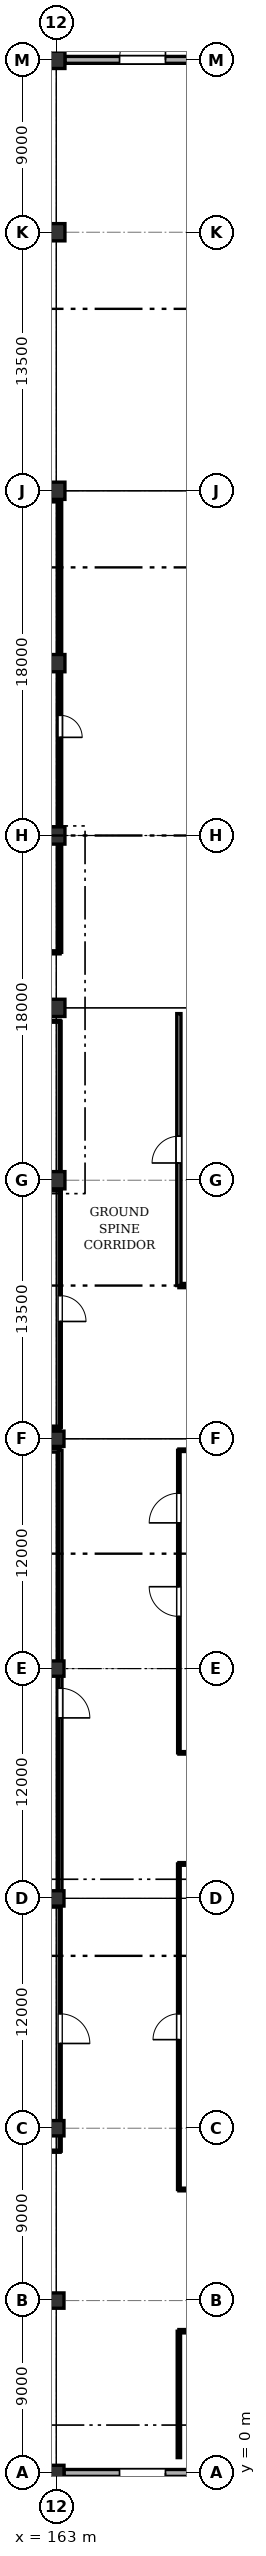
"""IFC4 building model, lengths in metres.
Left out: names, types, materials, properties, quantities, classifications, styles, units other than length and angle.
Written with IfcOpenShell. Run it as: python <this file> out.ifc"""

import sys

from ifc_helpers import new_model, si_unit, direction, frame, frame_2d, origin, origin_2d, place, context, subcontext, project, spatial, rectangle, extrude, element, fill, save


model = new_model("IFC4")
c1 = context("Model", 3, precision=1e-05, world=origin(), true_north=direction((0.0, 1.0)))
c2 = subcontext(c1, "Body", "Model", "MODEL_VIEW")
j1 = project(units=[si_unit("LENGTHUNIT", "METRE"), si_unit("PLANEANGLEUNIT", "RADIAN")], contexts=[c1])
p1 = place(None, origin())
s1 = spatial("IfcSite", under=j1, at=p1, CompositionType="ELEMENT")
p2 = place(p1, origin())
s2 = spatial("IfcBuilding", under=s1, at=p2, CompositionType="ELEMENT")
p3 = place(p2, origin())
s3 = spatial("IfcBuildingStorey", under=s2, at=p3, CompositionType="ELEMENT", Elevation=0.0)
for number, where, z_axis, x_axis in (
    (1, (163.0, 0.0, 0.0), (0.0, 0.0, 1.0), (1.0, 0.0, 0.0)),
    (2, (163.0, 9.0, 0.0), (0.0, 0.0, 1.0), (1.0, 0.0, 0.0)),
    (3, (163.0, 18.0, 0.0), (0.0, 0.0, 1.0), (1.0, 0.0, 0.0)),
    (4, (163.0, 30.0, 0.0), (0.0, 0.0, 1.0), (1.0, 0.0, 0.0)),
    (5, (163.0, 42.0, 0.0), (0.0, 0.0, 1.0), (1.0, 0.0, 0.0)),
    (6, (163.0, 54.0, 0.0), (0.0, 0.0, 1.0), (1.0, 0.0, 0.0)),
):
    element("IfcColumn", number, at=place(p3, frame(where, z_axis=z_axis, x_axis=x_axis)), inside=s3, PredefinedType="COLUMN", context=c2, shape_type="SweptSolid", body=[
        extrude(rectangle(XDim=0.8, YDim=0.8, at=origin_2d()), origin(), (0.0, 0.0, 1.0), 6.6),
    ])
for number, where, z_axis, x_axis in (
    (7, (163.0, 67.5, 0.0), (0.0, 0.0, 1.0), (1.0, 0.0, 0.0)),
    (8, (163.0, 76.5, 0.0), (0.0, 0.0, 1.0), (1.0, 0.0, 0.0)),
    (9, (163.0, 85.5, 0.0), (0.0, 0.0, 1.0), (1.0, 0.0, 0.0)),
    (10, (163.0, 94.5, 0.0), (0.0, 0.0, 1.0), (1.0, 0.0, 0.0)),
    (11, (163.0, 103.5, 0.0), (0.0, 0.0, 1.0), (1.0, 0.0, 0.0)),
    (12, (163.0, 117.0, 0.0), (0.0, 0.0, 1.0), (1.0, 0.0, 0.0)),
    (13, (163.0, 126.0, 0.0), (0.0, 0.0, 1.0), (1.0, 0.0, 0.0)),
):
    element("IfcColumn", number, at=place(p3, frame(where, z_axis=z_axis, x_axis=x_axis)), inside=s3, PredefinedType="COLUMN", context=c2, shape_type="SweptSolid", body=[
        extrude(rectangle(XDim=0.9, YDim=0.9, at=origin_2d()), origin(), (0.0, 0.0, 1.0), 6.6),
    ])
p4 = place(p3, frame((171.6, 0.0, 0.0), z_axis=(0.0, 0.0, 1.0), x_axis=(-1.0, 0.0, 0.0)))
e14 = element("IfcWall", 14, at=p4, inside=s3, PredefinedType="SOLIDWALL", context=c2, shape_type="SweptSolid", body=[
    extrude(rectangle(XDim=8.2, YDim=0.36, at=frame_2d((4.1, 0.0))), origin(), (0.0, 0.0, 1.0), 5.875),
])
p5 = place(p4, frame((2.9, 0.0, 0.0)))
e15 = element("IfcOpeningElement", 15, at=p5, cuts=e14, PredefinedType="OPENING", context=c2, shape_type="SweptSolid", body=[
    extrude(rectangle(XDim=2.4, YDim=2.5, at=frame_2d((1.2, 1.25))), frame((0.0, 0.19, 0.0), z_axis=(0.0, -1.0, 0.0), x_axis=(1.0, 0.0, 0.0)), (0.0, 0.0, 1.0), 0.38),
])
p6 = place(p3, frame((163.45, 126.0, 0.0), z_axis=(0.0, 0.0, 1.0), x_axis=(1.0, 0.0, 0.0)))
e16 = element("IfcWall", 16, at=p6, inside=s3, PredefinedType="SOLIDWALL", context=c2, shape_type="SweptSolid", body=[
    extrude(rectangle(XDim=8.1, YDim=0.36, at=frame_2d((4.05, 0.0))), origin(), (0.0, 0.0, 1.0), 5.875),
])
p7 = place(p6, frame((2.85, 0.0, 0.0)))
e17 = element("IfcOpeningElement", 17, at=p7, cuts=e16, PredefinedType="OPENING", context=c2, shape_type="SweptSolid", body=[
    extrude(rectangle(XDim=2.4, YDim=2.5, at=frame_2d((1.2, 1.25))), frame((0.0, 0.19, 0.0), z_axis=(0.0, -1.0, 0.0), x_axis=(1.0, 0.0, 0.0)), (0.0, 0.0, 1.0), 0.38),
])
for number, where, z_axis, x_axis in (
    (18, (163.2, 16.8, 0.0), (0.0, 0.0, 1.0), (-1.0, 0.0, 0.0)),
    (19, (152.6, 29.6, 0.0), (0.0, 0.0, 1.0), (1.0, 0.0, 0.0)),
):
    element("IfcWall", number, at=place(p3, frame(where, z_axis=z_axis, x_axis=x_axis)), inside=s3, PredefinedType="PARTITIONING", context=c2, shape_type="SweptSolid", body=[
        extrude(rectangle(XDim=10.6, YDim=0.11, at=frame_2d((5.3, 0.0))), origin(), (0.0, 0.0, 1.0), 4.4),
    ])
p8 = place(p3, frame((163.2, 29.6, 0.0), z_axis=(0.0, 0.0, 1.0), x_axis=(0.0, -1.0, 0.0)))
e20 = element("IfcWall", 20, at=p8, inside=s3, PredefinedType="PARTITIONING", context=c2, shape_type="SweptSolid", body=[
    extrude(rectangle(XDim=12.8, YDim=0.11, at=frame_2d((6.4, 0.0))), origin(), (0.0, 0.0, 1.0), 4.4),
])
p9 = place(p8, frame((5.625, 0.0, 0.0)))
e21 = element("IfcOpeningElement", 21, at=p9, cuts=e20, PredefinedType="OPENING", context=c2, shape_type="SweptSolid", body=[
    extrude(rectangle(XDim=1.55, YDim=2.1, at=frame_2d((0.775, 1.05))), frame((0.0, 0.065, 0.0), z_axis=(0.0, -1.0, 0.0), x_axis=(1.0, 0.0, 0.0)), (0.0, 0.0, 1.0), 0.13),
])
p10 = place(p3, frame((136.8, 53.4, 0.0), z_axis=(0.0, 0.0, 1.0), x_axis=(1.0, 0.0, 0.0)))
e22 = element("IfcWall", 22, at=p10, inside=s3, PredefinedType="PARTITIONING", context=c2, shape_type="SweptSolid", body=[
    extrude(rectangle(XDim=26.4, YDim=0.19, at=frame_2d((13.2, 0.0))), origin(), (0.0, 0.0, 1.0), 4.4),
])
p11 = place(p3, frame((163.2, 53.4, 0.0), z_axis=(0.0, 0.0, 1.0), x_axis=(0.0, -1.0, 0.0)))
e23 = element("IfcWall", 23, at=p11, inside=s3, PredefinedType="PARTITIONING", context=c2, shape_type="SweptSolid", body=[
    extrude(rectangle(XDim=23.2, YDim=0.19, at=frame_2d((11.6, 0.0))), origin(), (0.0, 0.0, 1.0), 4.4),
])
p12 = place(p11, frame((12.425, 0.0, 0.0)))
e24 = element("IfcOpeningElement", 24, at=p12, cuts=e23, PredefinedType="OPENING", context=c2, shape_type="SweptSolid", body=[
    extrude(rectangle(XDim=1.55, YDim=2.1, at=frame_2d((0.775, 1.05))), frame((0.0, 0.105, 0.0), z_axis=(0.0, -1.0, 0.0), x_axis=(1.0, 0.0, 0.0)), (0.0, 0.0, 1.0), 0.21),
])
p13 = place(p3, frame((169.4, 7.4, 0.0), z_axis=(0.0, 0.0, 1.0), x_axis=(1.0, 0.0, 0.0)))
e25 = element("IfcWall", 25, at=p13, inside=s3, PredefinedType="PARTITIONING", context=c2, shape_type="SweptSolid", body=[
    extrude(rectangle(XDim=9.6, YDim=0.175, at=frame_2d((4.8, 0.0))), origin(), (0.0, 0.0, 1.0), 4.4),
])
p14 = place(p13, frame((4.125, 0.0, 0.0)))
e26 = element("IfcOpeningElement", 26, at=p14, cuts=e25, PredefinedType="OPENING", context=c2, shape_type="SweptSolid", body=[
    extrude(rectangle(XDim=1.35, YDim=2.1, at=frame_2d((0.675, 1.05))), frame((0.0, 0.097, 0.0), z_axis=(0.0, -1.0, 0.0), x_axis=(1.0, 0.0, 0.0)), (0.0, 0.0, 1.0), 0.195),
])
p15 = place(p3, frame((169.4, 0.8, 0.0), z_axis=(0.0, 0.0, 1.0), x_axis=(0.0, 1.0, 0.0)))
e27 = element("IfcWall", 27, at=p15, inside=s3, PredefinedType="PARTITIONING", context=c2, shape_type="SweptSolid", body=[
    extrude(rectangle(XDim=6.6, YDim=0.175, at=frame_2d((3.3, 0.0))), origin(), (0.0, 0.0, 1.0), 4.4),
])
for number, where, z_axis, x_axis in (
    (28, (187.2, 14.8, 0.0), (0.0, 0.0, 1.0), (-1.0, 0.0, 0.0)),
    (29, (169.4, 31.8, 0.0), (0.0, 0.0, 1.0), (1.0, 0.0, 0.0)),
):
    element("IfcWall", number, at=place(p3, frame(where, z_axis=z_axis, x_axis=x_axis)), inside=s3, PredefinedType="PARTITIONING", context=c2, shape_type="SweptSolid", body=[
        extrude(rectangle(XDim=17.8, YDim=0.14, at=frame_2d((8.9, 0.0))), origin(), (0.0, 0.0, 1.0), 4.4),
    ])
p16 = place(p3, frame((169.4, 14.8, 0.0), z_axis=(0.0, 0.0, 1.0), x_axis=(0.0, 1.0, 0.0)))
e30 = element("IfcWall", 30, at=p16, inside=s3, PredefinedType="PARTITIONING", context=c2, shape_type="SweptSolid", body=[
    extrude(rectangle(XDim=17.0, YDim=0.14, at=frame_2d((8.5, 0.0))), origin(), (0.0, 0.0, 1.0), 4.4),
])
p17 = place(p16, frame((7.825, 0.0, 0.0)))
e31 = element("IfcOpeningElement", 31, at=p17, cuts=e30, PredefinedType="OPENING", context=c2, shape_type="SweptSolid", body=[
    extrude(rectangle(XDim=1.35, YDim=2.1, at=frame_2d((0.675, 1.05))), frame((0.0, 0.08, 0.0), z_axis=(0.0, -1.0, 0.0), x_axis=(1.0, 0.0, 0.0)), (0.0, 0.0, 1.0), 0.16),
])
for number, where, z_axis, x_axis in (
    (32, (187.2, 37.6, 0.0), (0.0, 0.0, 1.0), (-1.0, 0.0, 0.0)),
    (33, (169.4, 53.4, 0.0), (0.0, 0.0, 1.0), (1.0, 0.0, 0.0)),
):
    element("IfcWall", number, at=place(p3, frame(where, z_axis=z_axis, x_axis=x_axis)), inside=s3, PredefinedType="PARTITIONING", context=c2, shape_type="SweptSolid", body=[
        extrude(rectangle(XDim=17.8, YDim=0.13, at=frame_2d((8.9, 0.0))), origin(), (0.0, 0.0, 1.0), 4.4),
    ])
p18 = place(p3, frame((169.4, 37.6, 0.0), z_axis=(0.0, 0.0, 1.0), x_axis=(0.0, 1.0, 0.0)))
e34 = element("IfcWall", 34, at=p18, inside=s3, PredefinedType="PARTITIONING", context=c2, shape_type="SweptSolid", body=[
    extrude(rectangle(XDim=15.8, YDim=0.13, at=frame_2d((7.9, 0.0))), origin(), (0.0, 0.0, 1.0), 4.4),
])
p19 = place(p18, frame((7.125, 0.0, 0.0)))
e35 = element("IfcOpeningElement", 35, at=p19, cuts=e34, PredefinedType="OPENING", context=c2, shape_type="SweptSolid", body=[
    extrude(rectangle(XDim=1.55, YDim=2.1, at=frame_2d((0.775, 1.05))), frame((0.0, 0.075, 0.0), z_axis=(0.0, -1.0, 0.0), x_axis=(1.0, 0.0, 0.0)), (0.0, 0.0, 1.0), 0.15),
])
p20 = place(p18, frame((12.008, 0.0, 0.0)))
e36 = element("IfcOpeningElement", 36, at=p20, cuts=e34, PredefinedType="OPENING", context=c2, shape_type="SweptSolid", body=[
    extrude(rectangle(XDim=1.55, YDim=2.1, at=frame_2d((0.775, 1.05))), frame((0.0, 0.075, 0.0), z_axis=(0.0, -1.0, 0.0), x_axis=(1.0, 0.0, 0.0)), (0.0, 0.0, 1.0), 0.15),
])
for number, where, z_axis, x_axis in (
    (37, (163.2, 54.6, 0.0), (0.0, 0.0, 1.0), (-1.0, 0.0, 0.0)),
    (38, (136.8, 67.0, 0.0), (0.0, 0.0, 1.0), (1.0, 0.0, 0.0)),
):
    element("IfcWall", number, at=place(p3, frame(where, z_axis=z_axis, x_axis=x_axis)), inside=s3, PredefinedType="PARTITIONING", context=c2, shape_type="SweptSolid", body=[
        extrude(rectangle(XDim=26.4, YDim=0.12, at=frame_2d((13.2, 0.0))), origin(), (0.0, 0.0, 1.0), 4.4),
    ])
p21 = place(p3, frame((163.2, 67.0, 0.0), z_axis=(0.0, 0.0, 1.0), x_axis=(0.0, -1.0, 0.0)))
e39 = element("IfcWall", 39, at=p21, inside=s3, PredefinedType="PARTITIONING", context=c2, shape_type="SweptSolid", body=[
    extrude(rectangle(XDim=12.4, YDim=0.12, at=frame_2d((6.2, 0.0))), origin(), (0.0, 0.0, 1.0), 4.4),
])
p22 = place(p21, frame((5.525, 0.0, 0.0)))
e40 = element("IfcOpeningElement", 40, at=p22, cuts=e39, PredefinedType="OPENING", context=c2, shape_type="SweptSolid", body=[
    extrude(rectangle(XDim=1.35, YDim=2.1, at=frame_2d((0.675, 1.05))), frame((0.0, 0.07, 0.0), z_axis=(0.0, -1.0, 0.0), x_axis=(1.0, 0.0, 0.0)), (0.0, 0.0, 1.0), 0.14),
])
p23 = place(p3, frame((150.0, 75.8, 0.0), z_axis=(0.0, 0.0, 1.0), x_axis=(1.0, 0.0, 0.0)))
e41 = element("IfcWall", 41, at=p23, inside=s3, PredefinedType="PARTITIONING", context=c2, shape_type="SweptSolid", body=[
    extrude(rectangle(XDim=13.2, YDim=0.1, at=frame_2d((6.6, 0.0))), origin(), (0.0, 0.0, 1.0), 4.4),
])
p24 = place(p23, frame((6.15, 0.0, 0.0)))
e42 = element("IfcOpeningElement", 42, at=p24, cuts=e41, PredefinedType="OPENING", context=c2, shape_type="SweptSolid", body=[
    extrude(rectangle(XDim=0.9, YDim=2.1, at=frame_2d((0.45, 1.05))), frame((0.0, 0.06, 0.0), z_axis=(0.0, -1.0, 0.0), x_axis=(1.0, 0.0, 0.0)), (0.0, 0.0, 1.0), 0.12),
])
p25 = place(p3, frame((163.2, 75.8, 0.0), z_axis=(0.0, 0.0, 1.0), x_axis=(0.0, -1.0, 0.0)))
e43 = element("IfcWall", 43, at=p25, inside=s3, PredefinedType="PARTITIONING", context=c2, shape_type="SweptSolid", body=[
    extrude(rectangle(XDim=8.2, YDim=0.1, at=frame_2d((4.1, 0.0))), origin(), (0.0, 0.0, 1.0), 4.4),
])
for number, where, z_axis, x_axis in (
    (44, (163.2, 79.4, 0.0), (0.0, 0.0, 1.0), (-1.0, 0.0, 0.0)),
    (45, (145.8, 103.0, 0.0), (0.0, 0.0, 1.0), (1.0, 0.0, 0.0)),
):
    element("IfcWall", number, at=place(p3, frame(where, z_axis=z_axis, x_axis=x_axis)), inside=s3, PredefinedType="PARTITIONING", context=c2, shape_type="SweptSolid", body=[
        extrude(rectangle(XDim=17.4, YDim=0.16, at=frame_2d((8.7, 0.0))), origin(), (0.0, 0.0, 1.0), 4.4),
    ])
p26 = place(p3, frame((163.2, 103.0, 0.0), z_axis=(0.0, 0.0, 1.0), x_axis=(0.0, -1.0, 0.0)))
e46 = element("IfcWall", 46, at=p26, inside=s3, PredefinedType="PARTITIONING", context=c2, shape_type="SweptSolid", body=[
    extrude(rectangle(XDim=23.6, YDim=0.16, at=frame_2d((11.8, 0.0))), origin(), (0.0, 0.0, 1.0), 4.4),
])
p27 = place(p26, frame((11.225, 0.0, 0.0)))
e47 = element("IfcOpeningElement", 47, at=p27, cuts=e46, PredefinedType="OPENING", context=c2, shape_type="SweptSolid", body=[
    extrude(rectangle(XDim=1.15, YDim=2.1, at=frame_2d((0.575, 1.05))), frame((0.0, 0.09, 0.0), z_axis=(0.0, -1.0, 0.0), x_axis=(1.0, 0.0, 0.0)), (0.0, 0.0, 1.0), 0.18),
])
p28 = place(p3, frame((187.2, 62.0, 0.0), z_axis=(0.0, 0.0, 1.0), x_axis=(-1.0, 0.0, 0.0)))
e48 = element("IfcWall", 48, at=p28, inside=s3, PredefinedType="SOLIDWALL", context=c2, shape_type="SweptSolid", body=[
    extrude(rectangle(XDim=17.8, YDim=0.22, at=frame_2d((8.9, 0.0))), origin(), (0.0, 0.0, 1.0), 4.4),
])
p29 = place(p3, frame((169.4, 62.0, 0.0), z_axis=(0.0, 0.0, 1.0), x_axis=(0.0, 1.0, 0.0)))
e49 = element("IfcWall", 49, at=p29, inside=s3, PredefinedType="SOLIDWALL", context=c2, shape_type="SweptSolid", body=[
    extrude(rectangle(XDim=14.2, YDim=0.22, at=frame_2d((7.1, 0.0))), origin(), (0.0, 0.0, 1.0), 4.4),
])
p30 = place(p29, frame((6.4, 0.0, 0.0)))
e50 = element("IfcOpeningElement", 50, at=p30, cuts=e49, PredefinedType="OPENING", context=c2, shape_type="SweptSolid", body=[
    extrude(rectangle(XDim=1.4, YDim=2.1, at=frame_2d((0.7, 1.05))), frame((0.0, 0.12, 0.0), z_axis=(0.0, -1.0, 0.0), x_axis=(1.0, 0.0, 0.0)), (0.0, 0.0, 1.0), 0.24),
])
p31 = place(p5, origin())
e51 = element("IfcDoor", 51, at=p31, inside=s3, OperationType="SINGLE_SWING_LEFT", PredefinedType="DOOR", context=c2, shape_type="SweptSolid", body=[
    extrude(rectangle(XDim=2.4, YDim=2.5, at=frame_2d((1.2, 1.25))), frame((0.0, 0.025, 0.0), z_axis=(0.0, -1.0, 0.0), x_axis=(1.0, 0.0, 0.0)), (0.0, 0.0, 1.0), 0.05),
])
fill(e15, e51)
p32 = place(p7, origin())
e52 = element("IfcDoor", 52, at=p32, inside=s3, OperationType="SINGLE_SWING_RIGHT", PredefinedType="DOOR", context=c2, shape_type="SweptSolid", body=[
    extrude(rectangle(XDim=2.4, YDim=2.5, at=frame_2d((1.2, 1.25))), frame((0.0, 0.025, 0.0), z_axis=(0.0, -1.0, 0.0), x_axis=(1.0, 0.0, 0.0)), (0.0, 0.0, 1.0), 0.05),
])
fill(e17, e52)
p33 = place(p9, origin())
e53 = element("IfcDoor", 53, at=p33, inside=s3, OperationType="SINGLE_SWING_RIGHT", PredefinedType="DOOR", context=c2, shape_type="SweptSolid", body=[
    extrude(rectangle(XDim=1.55, YDim=2.1, at=frame_2d((0.775, 1.05))), frame((0.0, 0.025, 0.0), z_axis=(0.0, -1.0, 0.0), x_axis=(1.0, 0.0, 0.0)), (0.0, 0.0, 1.0), 0.05),
])
fill(e21, e53)
p34 = place(p12, origin())
e54 = element("IfcDoor", 54, at=p34, inside=s3, OperationType="SINGLE_SWING_RIGHT", PredefinedType="DOOR", context=c2, shape_type="SweptSolid", body=[
    extrude(rectangle(XDim=1.55, YDim=2.1, at=frame_2d((0.775, 1.05))), frame((0.0, 0.025, 0.0), z_axis=(0.0, -1.0, 0.0), x_axis=(1.0, 0.0, 0.0)), (0.0, 0.0, 1.0), 0.05),
])
fill(e24, e54)
p35 = place(p17, origin())
e55 = element("IfcDoor", 55, at=p35, inside=s3, OperationType="SINGLE_SWING_LEFT", PredefinedType="DOOR", context=c2, shape_type="SweptSolid", body=[
    extrude(rectangle(XDim=1.35, YDim=2.1, at=frame_2d((0.675, 1.05))), frame((0.0, 0.025, 0.0), z_axis=(0.0, -1.0, 0.0), x_axis=(1.0, 0.0, 0.0)), (0.0, 0.0, 1.0), 0.05),
])
fill(e31, e55)
p36 = place(p19, origin())
e56 = element("IfcDoor", 56, at=p36, inside=s3, OperationType="SINGLE_SWING_RIGHT", PredefinedType="DOOR", context=c2, shape_type="SweptSolid", body=[
    extrude(rectangle(XDim=1.55, YDim=2.1, at=frame_2d((0.775, 1.05))), frame((0.0, 0.025, 0.0), z_axis=(0.0, -1.0, 0.0), x_axis=(1.0, 0.0, 0.0)), (0.0, 0.0, 1.0), 0.05),
])
fill(e35, e56)
p37 = place(p20, origin())
e57 = element("IfcDoor", 57, at=p37, inside=s3, OperationType="SINGLE_SWING_LEFT", PredefinedType="DOOR", context=c2, shape_type="SweptSolid", body=[
    extrude(rectangle(XDim=1.55, YDim=2.1, at=frame_2d((0.775, 1.05))), frame((0.0, 0.025, 0.0), z_axis=(0.0, -1.0, 0.0), x_axis=(1.0, 0.0, 0.0)), (0.0, 0.0, 1.0), 0.05),
])
fill(e36, e57)
p38 = place(p22, origin())
e58 = element("IfcDoor", 58, at=p38, inside=s3, OperationType="SINGLE_SWING_RIGHT", PredefinedType="DOOR", context=c2, shape_type="SweptSolid", body=[
    extrude(rectangle(XDim=1.35, YDim=2.1, at=frame_2d((0.675, 1.05))), frame((0.0, 0.025, 0.0), z_axis=(0.0, -1.0, 0.0), x_axis=(1.0, 0.0, 0.0)), (0.0, 0.0, 1.0), 0.05),
])
fill(e40, e58)
p39 = place(p27, origin())
e59 = element("IfcDoor", 59, at=p39, inside=s3, OperationType="SINGLE_SWING_RIGHT", PredefinedType="DOOR", context=c2, shape_type="SweptSolid", body=[
    extrude(rectangle(XDim=1.15, YDim=2.1, at=frame_2d((0.575, 1.05))), frame((0.0, 0.025, 0.0), z_axis=(0.0, -1.0, 0.0), x_axis=(1.0, 0.0, 0.0)), (0.0, 0.0, 1.0), 0.05),
])
fill(e47, e59)
p40 = place(p30, origin())
e60 = element("IfcDoor", 60, at=p40, inside=s3, OperationType="SINGLE_SWING_LEFT", PredefinedType="DOOR", context=c2, shape_type="SweptSolid", body=[
    extrude(rectangle(XDim=1.4, YDim=2.1, at=frame_2d((0.7, 1.05))), frame((0.0, 0.025, 0.0), z_axis=(0.0, -1.0, 0.0), x_axis=(1.0, 0.0, 0.0)), (0.0, 0.0, 1.0), 0.05),
])
fill(e50, e60)
save(model, sys.argv[1])
